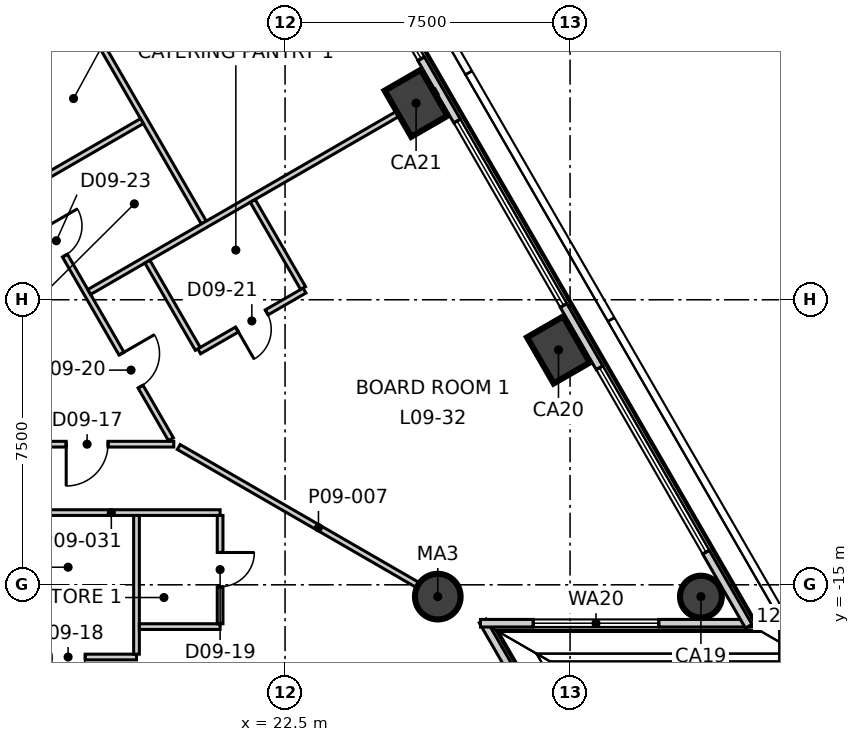
"""IFC4 building model, lengths in metres.
Left out: names, types, materials, properties, quantities, classifications, styles, units other than length and angle.
Written with IfcOpenShell. Run it as: python <this file> out.ifc"""

import sys

from ifc_helpers import new_model, si_unit, direction, frame, frame_2d, origin, origin_2d, place, context, subcontext, project, spatial, rectangle, circle, extrude, element, fill, save


model = new_model("IFC4")
c1 = context("Model", 3, precision=1e-05, world=origin(), true_north=direction((0.0, 1.0)))
c2 = subcontext(c1, "Body", "Model", "MODEL_VIEW")
j1 = project(units=[si_unit("LENGTHUNIT", "METRE"), si_unit("PLANEANGLEUNIT", "RADIAN")], contexts=[c1])
p1 = place(None, origin())
s1 = spatial("IfcSite", under=j1, at=p1, CompositionType="ELEMENT")
p2 = place(p1, origin())
s2 = spatial("IfcBuilding", under=s1, at=p2, CompositionType="ELEMENT")
p3 = place(p2, frame((0.0, 0.0, 47.3)))
s3 = spatial("IfcBuildingStorey", under=s2, at=p3, CompositionType="ELEMENT", Elevation=47.3)
p4 = place(p3, frame((33.443, -15.311, -0.3), z_axis=(0.0, 0.0, 1.0), x_axis=(-0.5, 0.866025403784, 0.0)))
e1 = element("IfcColumn", 1, at=p4, inside=s3, PredefinedType="COLUMN", context=c2, shape_type="SweptSolid", body=[
    extrude(circle(Radius=0.55, at=origin_2d()), origin(), (0.0, 0.0, 1.0), 4.0),
])
for number, where, z_axis, x_axis in (
    (2, (29.695, -8.82, -0.3), (0.0, 0.0, 1.0), (-0.5, 0.866, 0.0)),
    (3, (25.948, -2.329, -0.3), (0.0, 0.0, 1.0), (-0.5, 0.866, 0.0)),
):
    element("IfcColumn", number, at=place(p3, frame(where, z_axis=z_axis, x_axis=x_axis)), inside=s3, PredefinedType="COLUMN", context=c2, shape_type="SweptSolid", body=[
        extrude(rectangle(XDim=1.4, YDim=1.1, at=origin_2d()), origin(), (0.0, 0.0, 1.0), 4.0),
    ])
p5 = place(p3, frame((26.519, -15.311, -0.3), z_axis=(0.0, 0.0, 1.0), x_axis=(1.0, 0.0, 0.0)))
e4 = element("IfcColumn", 4, at=p5, inside=s3, PredefinedType="COLUMN", context=c2, shape_type="SweptSolid", body=[
    extrude(circle(Radius=0.6, at=origin_2d()), origin(), (0.0, 0.0, 1.0), 4.0),
])
p6 = place(p3, frame((31.239, -22.085, 0.0), z_axis=(0.0, 0.0, 1.0), x_axis=(-0.499993928037, 0.866028909405, 0.0)))
e5 = element("IfcWall", 5, at=p6, inside=s3, PredefinedType="ELEMENTEDWALL", context=c2, shape_type="SweptSolid", body=[
    extrude(rectangle(XDim=7.084, YDim=0.2, at=frame_2d((3.542, 0.0))), origin(), (0.0, 0.0, 1.0), 3.7),
])
p7 = place(p6, frame((1.99, 0.0, 0.9)))
e6 = element("IfcOpeningElement", 6, at=p7, cuts=e5, PredefinedType="OPENING", context=c2, shape_type="SweptSolid", body=[
    extrude(rectangle(XDim=3.3, YDim=2.5, at=frame_2d((1.65, 1.25))), frame((0.0, 0.11, 0.0), z_axis=(0.0, -1.0, 0.0), x_axis=(1.0, 0.0, 0.0)), (0.0, 0.0, 1.0), 0.22),
])
p8 = place(p3, frame((27.642, -16.011, 0.0), z_axis=(0.0, 0.0, 1.0), x_axis=(1.0, 0.0, 0.0)))
e7 = element("IfcWall", 7, at=p8, inside=s3, PredefinedType="ELEMENTEDWALL", context=c2, shape_type="SweptSolid", body=[
    extrude(rectangle(XDim=7.084, YDim=0.2, at=frame_2d((3.542, 0.0))), origin(), (0.0, 0.0, 1.0), 3.7),
])
p9 = place(p8, frame((1.39, 0.0, 0.9)))
e8 = element("IfcOpeningElement", 8, at=p9, cuts=e7, PredefinedType="OPENING", context=c2, shape_type="SweptSolid", body=[
    extrude(rectangle(XDim=3.3, YDim=2.5, at=frame_2d((1.65, 1.25))), frame((0.0, 0.11, 0.0), z_axis=(0.0, -1.0, 0.0), x_axis=(1.0, 0.0, 0.0)), (0.0, 0.0, 1.0), 0.22),
])
p10 = place(p3, frame((34.701, -16.089, 0.0), z_axis=(0.0, 0.0, 1.0), x_axis=(-0.499998722828, 0.866026141159, 0.0)))
e9 = element("IfcWall", 9, at=p10, inside=s3, PredefinedType="ELEMENTEDWALL", context=c2, shape_type="SweptSolid", body=[
    extrude(rectangle(XDim=62.548, YDim=0.2, at=frame_2d((31.274, 0.0))), origin(), (0.0, 0.0, 1.0), 3.7),
])
p11 = place(p10, frame((2.25, 0.0, 0.9)))
e10 = element("IfcOpeningElement", 10, at=p11, cuts=e9, PredefinedType="OPENING", context=c2, shape_type="SweptSolid", body=[
    extrude(rectangle(XDim=5.6, YDim=2.5, at=frame_2d((2.8, 1.25))), frame((0.0, 0.11, 0.0), z_axis=(0.0, -1.0, 0.0), x_axis=(1.0, 0.0, 0.0)), (0.0, 0.0, 1.0), 0.22),
])
p12 = place(p10, frame((9.746, 0.0, 0.9)))
e11 = element("IfcOpeningElement", 11, at=p12, cuts=e9, PredefinedType="OPENING", context=c2, shape_type="SweptSolid", body=[
    extrude(rectangle(XDim=5.6, YDim=2.5, at=frame_2d((2.8, 1.25))), frame((0.0, 0.11, 0.0), z_axis=(0.0, -1.0, 0.0), x_axis=(1.0, 0.0, 0.0)), (0.0, 0.0, 1.0), 0.22),
])
p13 = place(p10, frame((17.241, 0.0, 0.9)))
e12 = element("IfcOpeningElement", 12, at=p13, cuts=e9, PredefinedType="OPENING", context=c2, shape_type="SweptSolid", body=[
    extrude(rectangle(XDim=5.6, YDim=2.5, at=frame_2d((2.8, 1.25))), frame((0.0, 0.11, 0.0), z_axis=(0.0, -1.0, 0.0), x_axis=(1.0, 0.0, 0.0)), (0.0, 0.0, 1.0), 0.22),
])
p14 = place(p10, frame((24.736, 0.0, 0.9)))
e13 = element("IfcOpeningElement", 13, at=p14, cuts=e9, PredefinedType="OPENING", context=c2, shape_type="SweptSolid", body=[
    extrude(rectangle(XDim=5.6, YDim=2.5, at=frame_2d((2.8, 1.25))), frame((0.0, 0.11, 0.0), z_axis=(0.0, -1.0, 0.0), x_axis=(1.0, 0.0, 0.0)), (0.0, 0.0, 1.0), 0.22),
])
p15 = place(p10, frame((32.232, 0.0, 0.9)))
e14 = element("IfcOpeningElement", 14, at=p15, cuts=e9, PredefinedType="OPENING", context=c2, shape_type="SweptSolid", body=[
    extrude(rectangle(XDim=5.6, YDim=2.5, at=frame_2d((2.8, 1.25))), frame((0.0, 0.11, 0.0), z_axis=(0.0, -1.0, 0.0), x_axis=(1.0, 0.0, 0.0)), (0.0, 0.0, 1.0), 0.22),
])
p16 = place(p10, frame((39.727, 0.0, 0.9)))
e15 = element("IfcOpeningElement", 15, at=p16, cuts=e9, PredefinedType="OPENING", context=c2, shape_type="SweptSolid", body=[
    extrude(rectangle(XDim=5.6, YDim=2.5, at=frame_2d((2.8, 1.25))), frame((0.0, 0.11, 0.0), z_axis=(0.0, -1.0, 0.0), x_axis=(1.0, 0.0, 0.0)), (0.0, 0.0, 1.0), 0.22),
])
p17 = place(p10, frame((47.222, 0.0, 0.9)))
e16 = element("IfcOpeningElement", 16, at=p17, cuts=e9, PredefinedType="OPENING", context=c2, shape_type="SweptSolid", body=[
    extrude(rectangle(XDim=5.6, YDim=2.5, at=frame_2d((2.8, 1.25))), frame((0.0, 0.11, 0.0), z_axis=(0.0, -1.0, 0.0), x_axis=(1.0, 0.0, 0.0)), (0.0, 0.0, 1.0), 0.22),
])
p18 = place(p10, frame((54.717, 0.0, 0.9)))
e17 = element("IfcOpeningElement", 17, at=p18, cuts=e9, PredefinedType="OPENING", context=c2, shape_type="SweptSolid", body=[
    extrude(rectangle(XDim=5.6, YDim=2.5, at=frame_2d((2.8, 1.25))), frame((0.0, 0.11, 0.0), z_axis=(0.0, -1.0, 0.0), x_axis=(1.0, 0.0, 0.0)), (0.0, 0.0, 1.0), 0.22),
])
p19 = place(p3, frame((-19.422, -11.3, 0.0), z_axis=(0.0, 0.0, 1.0), x_axis=(1.0, 0.0, 0.0)))
e18 = element("IfcWall", 18, at=p19, inside=s3, PredefinedType="PARTITIONING", context=c2, shape_type="SweptSolid", body=[
    extrude(rectangle(XDim=38.994, YDim=0.15, at=frame_2d((19.497, 0.0))), origin(), (0.0, 0.0, 1.0), 3.7),
])
p20 = place(p19, frame((1.6, 0.0, 0.0)))
e19 = element("IfcOpeningElement", 19, at=p20, cuts=e18, PredefinedType="OPENING", context=c2, shape_type="SweptSolid", body=[
    extrude(rectangle(XDim=1.1, YDim=2.1, at=frame_2d((0.55, 1.05))), frame((0.0, 0.085, 0.0), z_axis=(0.0, -1.0, 0.0), x_axis=(1.0, 0.0, 0.0)), (0.0, 0.0, 1.0), 0.17),
])
p21 = place(p19, frame((7.682, 0.0, 0.0)))
e20 = element("IfcOpeningElement", 20, at=p21, cuts=e18, PredefinedType="OPENING", context=c2, shape_type="SweptSolid", body=[
    extrude(rectangle(XDim=1.0, YDim=2.1, at=frame_2d((0.5, 1.05))), frame((0.0, 0.085, 0.0), z_axis=(0.0, -1.0, 0.0), x_axis=(1.0, 0.0, 0.0)), (0.0, 0.0, 1.0), 0.17),
])
p22 = place(p19, frame((15.177, 0.0, 0.0)))
e21 = element("IfcOpeningElement", 21, at=p22, cuts=e18, PredefinedType="OPENING", context=c2, shape_type="SweptSolid", body=[
    extrude(rectangle(XDim=1.0, YDim=2.1, at=frame_2d((0.5, 1.05))), frame((0.0, 0.085, 0.0), z_axis=(0.0, -1.0, 0.0), x_axis=(1.0, 0.0, 0.0)), (0.0, 0.0, 1.0), 0.17),
])
p23 = place(p19, frame((29.372, 0.0, 0.0)))
e22 = element("IfcOpeningElement", 22, at=p23, cuts=e18, PredefinedType="OPENING", context=c2, shape_type="SweptSolid", body=[
    extrude(rectangle(XDim=1.1, YDim=2.1, at=frame_2d((0.55, 1.05))), frame((0.0, 0.085, 0.0), z_axis=(0.0, -1.0, 0.0), x_axis=(1.0, 0.0, 0.0)), (0.0, 0.0, 1.0), 0.17),
])
p24 = place(p19, frame((20.772, 0.0, 0.0)))
e23 = element("IfcOpeningElement", 23, at=p24, cuts=e18, PredefinedType="OPENING", context=c2, shape_type="SweptSolid", body=[
    extrude(rectangle(XDim=0.9, YDim=2.1, at=frame_2d((0.45, 1.05))), frame((0.0, 0.085, 0.0), z_axis=(0.0, -1.0, 0.0), x_axis=(1.0, 0.0, 0.0)), (0.0, 0.0, 1.0), 0.17),
])
p25 = place(p19, frame((23.772, 0.0, 0.0)))
e24 = element("IfcOpeningElement", 24, at=p25, cuts=e18, PredefinedType="OPENING", context=c2, shape_type="SweptSolid", body=[
    extrude(rectangle(XDim=0.9, YDim=2.1, at=frame_2d((0.45, 1.05))), frame((0.0, 0.085, 0.0), z_axis=(0.0, -1.0, 0.0), x_axis=(1.0, 0.0, 0.0)), (0.0, 0.0, 1.0), 0.17),
])
p26 = place(p19, frame((36.163, 0.0, 0.0)))
e25 = element("IfcOpeningElement", 25, at=p26, cuts=e18, PredefinedType="OPENING", context=c2, shape_type="SweptSolid", body=[
    extrude(rectangle(XDim=1.1, YDim=2.1, at=frame_2d((0.55, 1.05))), frame((0.0, 0.085, 0.0), z_axis=(0.0, -1.0, 0.0), x_axis=(1.0, 0.0, 0.0)), (0.0, 0.0, 1.0), 0.17),
])
p27 = place(p3, frame((19.702, -11.374, 0.0), z_axis=(0.0, 0.0, 1.0), x_axis=(0.865962467537, -0.500108992938, 0.0)))
e26 = element("IfcWall", 26, at=p27, inside=s3, PredefinedType="PARTITIONING", context=c2, shape_type="SweptSolid", body=[
    extrude(rectangle(XDim=8.492, YDim=0.15, at=frame_2d((4.246, 0.0))), origin(), (0.0, 0.0, 1.0), 3.1),
])
p28 = place(p3, frame((0.075, 22.47, 0.0), z_axis=(0.0, 0.0, 1.0), x_axis=(0.500002280369, -0.866024087209, 0.0)))
e27 = element("IfcWall", 27, at=p28, inside=s3, PredefinedType="PARTITIONING", context=c2, shape_type="SweptSolid", body=[
    extrude(rectangle(XDim=38.844, YDim=0.15, at=frame_2d((19.422, 0.0))), origin(), (0.0, 0.0, 1.0), 3.7),
])
p29 = place(p28, frame((36.244, 0.0, 0.0)))
e28 = element("IfcOpeningElement", 28, at=p29, cuts=e27, PredefinedType="OPENING", context=c2, shape_type="SweptSolid", body=[
    extrude(rectangle(XDim=1.0, YDim=2.1, at=frame_2d((0.5, 1.05))), frame((0.0, 0.085, 0.0), z_axis=(0.0, -1.0, 0.0), x_axis=(1.0, 0.0, 0.0)), (0.0, 0.0, 1.0), 0.17),
])
p30 = place(p28, frame((21.963, 0.0, 0.0)))
e29 = element("IfcOpeningElement", 29, at=p30, cuts=e27, PredefinedType="OPENING", context=c2, shape_type="SweptSolid", body=[
    extrude(rectangle(XDim=1.1, YDim=2.1, at=frame_2d((0.55, 1.05))), frame((0.0, 0.085, 0.0), z_axis=(0.0, -1.0, 0.0), x_axis=(1.0, 0.0, 0.0)), (0.0, 0.0, 1.0), 0.17),
])
p31 = place(p28, frame((32.363, 0.0, 0.0)))
e30 = element("IfcOpeningElement", 30, at=p31, cuts=e27, PredefinedType="OPENING", context=c2, shape_type="SweptSolid", body=[
    extrude(rectangle(XDim=0.9, YDim=2.1, at=frame_2d((0.45, 1.05))), frame((0.0, 0.085, 0.0), z_axis=(0.0, -1.0, 0.0), x_axis=(1.0, 0.0, 0.0)), (0.0, 0.0, 1.0), 0.17),
])
p32 = place(p28, frame((29.163, 0.0, 0.0)))
e31 = element("IfcOpeningElement", 31, at=p32, cuts=e27, PredefinedType="OPENING", context=c2, shape_type="SweptSolid", body=[
    extrude(rectangle(XDim=0.9, YDim=2.1, at=frame_2d((0.45, 1.05))), frame((0.0, 0.085, 0.0), z_axis=(0.0, -1.0, 0.0), x_axis=(1.0, 0.0, 0.0)), (0.0, 0.0, 1.0), 0.17),
])
p33 = place(p28, frame((26.263, 0.0, 0.0)))
e32 = element("IfcOpeningElement", 32, at=p33, cuts=e27, PredefinedType="OPENING", context=c2, shape_type="SweptSolid", body=[
    extrude(rectangle(XDim=1.0, YDim=2.1, at=frame_2d((0.5, 1.05))), frame((0.0, 0.085, 0.0), z_axis=(0.0, -1.0, 0.0), x_axis=(1.0, 0.0, 0.0)), (0.0, 0.0, 1.0), 0.17),
])
p34 = place(p28, frame((9.071, 0.0, 0.0)))
e33 = element("IfcOpeningElement", 33, at=p34, cuts=e27, PredefinedType="OPENING", context=c2, shape_type="SweptSolid", body=[
    extrude(rectangle(XDim=1.1, YDim=2.1, at=frame_2d((0.55, 1.05))), frame((0.0, 0.085, 0.0), z_axis=(0.0, -1.0, 0.0), x_axis=(1.0, 0.0, 0.0)), (0.0, 0.0, 1.0), 0.17),
])
p35 = place(p3, frame((15.999, 2.088, 0.0), z_axis=(0.0, 0.0, 1.0), x_axis=(0.500054279689, -0.865994063124, 0.0)))
e34 = element("IfcWall", 34, at=p35, inside=s3, PredefinedType="PARTITIONING", context=c2, shape_type="SweptSolid", body=[
    extrude(rectangle(XDim=8.725, YDim=0.15, at=frame_2d((4.363, 0.0))), origin(), (0.0, 0.0, 1.0), 3.7),
])
p36 = place(p3, frame((14.147, -1.753, 0.0), z_axis=(0.0, 0.0, 1.0), x_axis=(0.865991092016, 0.500059425018, 0.0)))
e35 = element("IfcWall", 35, at=p36, inside=s3, PredefinedType="PARTITIONING", context=c2, shape_type="SweptSolid", body=[
    extrude(rectangle(XDim=3.449, YDim=0.15, at=frame_2d((1.725, 0.0))), origin(), (0.0, 0.0, 1.0), 3.7),
])
p37 = place(p3, frame((15.747, -4.524, 0.0), z_axis=(0.0, 0.0, 1.0), x_axis=(0.865973391227, 0.500090077572, 0.0)))
e36 = element("IfcWall", 36, at=p37, inside=s3, PredefinedType="PARTITIONING", context=c2, shape_type="SweptSolid", body=[
    extrude(rectangle(XDim=3.449, YDim=0.15, at=frame_2d((1.725, 0.0))), origin(), (0.0, 0.0, 1.0), 3.7),
])
p38 = place(p3, frame((17.347, -7.295, 0.0), z_axis=(0.0, 0.0, 1.0), x_axis=(0.866027613664, 0.499996172356, 0.0)))
e37 = element("IfcWall", 37, at=p38, inside=s3, PredefinedType="PARTITIONING", context=c2, shape_type="SweptSolid", body=[
    extrude(rectangle(XDim=10.552, YDim=0.15, at=frame_2d((5.276, 0.0))), origin(), (0.0, 0.0, 1.0), 3.7),
])
p39 = place(p3, frame((15.066, -16.9, 0.0), z_axis=(0.0, 0.0, 1.0), x_axis=(1.0, 0.0, 0.0)))
e38 = element("IfcWall", 38, at=p39, inside=s3, PredefinedType="PARTITIONING", context=c2, shape_type="SweptSolid", body=[
    extrude(rectangle(XDim=3.525, YDim=0.15, at=frame_2d((1.763, 0.0))), origin(), (0.0, 0.0, 1.0), 3.7),
])
p40 = place(p39, frame((1.275, 0.0, 0.0)))
e39 = element("IfcOpeningElement", 39, at=p40, cuts=e38, PredefinedType="OPENING", context=c2, shape_type="SweptSolid", body=[
    extrude(rectangle(XDim=0.9, YDim=2.1, at=frame_2d((0.45, 1.05))), frame((0.0, 0.085, 0.0), z_axis=(0.0, -1.0, 0.0), x_axis=(1.0, 0.0, 0.0)), (0.0, 0.0, 1.0), 0.17),
])
p41 = place(p3, frame((18.591, -16.825, 0.0), z_axis=(0.0, 0.0, 1.0), x_axis=(0.0, 1.0, 0.0)))
e40 = element("IfcWall", 40, at=p41, inside=s3, PredefinedType="PARTITIONING", context=c2, shape_type="SweptSolid", body=[
    extrude(rectangle(XDim=3.65, YDim=0.15, at=frame_2d((1.825, 0.0))), origin(), (0.0, 0.0, 1.0), 3.7),
])
p42 = place(p3, frame((15.066, -13.1, 0.0), z_axis=(0.0, 0.0, 1.0), x_axis=(1.0, 0.0, 0.0)))
e41 = element("IfcWall", 41, at=p42, inside=s3, PredefinedType="PARTITIONING", context=c2, shape_type="SweptSolid", body=[
    extrude(rectangle(XDim=5.725, YDim=0.15, at=frame_2d((2.863, 0.0))), origin(), (0.0, 0.0, 1.0), 3.7),
])
p43 = place(p3, frame((18.666, -16.1, 0.0), z_axis=(0.0, 0.0, 1.0), x_axis=(1.0, 0.0, 0.0)))
e42 = element("IfcWall", 42, at=p43, inside=s3, PredefinedType="PARTITIONING", context=c2, shape_type="SweptSolid", body=[
    extrude(rectangle(XDim=2.125, YDim=0.15, at=frame_2d((1.062, 0.0))), origin(), (0.0, 0.0, 1.0), 3.7),
])
p44 = place(p3, frame((20.791, -16.025, 0.0), z_axis=(0.0, 0.0, 1.0), x_axis=(0.0, 1.0, 0.0)))
e43 = element("IfcWall", 43, at=p44, inside=s3, PredefinedType="PARTITIONING", context=c2, shape_type="SweptSolid", body=[
    extrude(rectangle(XDim=2.85, YDim=0.15, at=frame_2d((1.425, 0.0))), origin(), (0.0, 0.0, 1.0), 3.7),
])
p45 = place(p44, frame((0.975, 0.0, 0.0)))
e44 = element("IfcOpeningElement", 44, at=p45, cuts=e43, PredefinedType="OPENING", context=c2, shape_type="SweptSolid", body=[
    extrude(rectangle(XDim=0.9, YDim=2.1, at=frame_2d((0.45, 1.05))), frame((0.0, 0.085, 0.0), z_axis=(0.0, -1.0, 0.0), x_axis=(1.0, 0.0, 0.0)), (0.0, 0.0, 1.0), 0.17),
])
p46 = place(p3, frame((20.24, -8.857, 0.0), z_axis=(0.0, 0.0, 1.0), x_axis=(0.866099216793, 0.499872130319, 0.0)))
e45 = element("IfcWall", 45, at=p46, inside=s3, PredefinedType="PARTITIONING", context=c2, shape_type="SweptSolid", body=[
    extrude(rectangle(XDim=3.2, YDim=0.15, at=frame_2d((1.6, 0.0))), origin(), (0.0, 0.0, 1.0), 3.7),
])
p47 = place(p46, frame((1.15, 0.0, 0.0)))
e46 = element("IfcOpeningElement", 46, at=p47, cuts=e45, PredefinedType="OPENING", context=c2, shape_type="SweptSolid", body=[
    extrude(rectangle(XDim=0.9, YDim=2.1, at=frame_2d((0.45, 1.05))), frame((0.0, 0.085, 0.0), z_axis=(0.0, -1.0, 0.0), x_axis=(1.0, 0.0, 0.0)), (0.0, 0.0, 1.0), 0.17),
])
for number, where, z_axis, x_axis in (
    (47, (21.649, -4.898, 0.0), (0.0, 0.0, 1.0), (0.5, -0.866, 0.0)),
    (48, (18.878, -6.498, 0.0), (0.0, 0.0, 1.0), (0.5, -0.866, 0.0)),
):
    element("IfcWall", number, at=place(p3, frame(where, z_axis=z_axis, x_axis=x_axis)), inside=s3, PredefinedType="PARTITIONING", context=c2, shape_type="SweptSolid", body=[
        extrude(rectangle(XDim=2.649, YDim=0.15, at=frame_2d((1.325, 0.0))), origin(), (0.0, 0.0, 1.0), 3.7),
    ])
p48 = place(p9, origin())
e49 = element("IfcWindow", 49, at=p48, inside=s3, PartitioningType="SINGLE_PANEL", PredefinedType="WINDOW", context=c2, shape_type="SweptSolid", body=[
    extrude(rectangle(XDim=3.3, YDim=2.5, at=frame_2d((1.65, 1.25))), frame((0.0, 0.03, 0.0), z_axis=(0.0, -1.0, 0.0), x_axis=(1.0, 0.0, 0.0)), (0.0, 0.0, 1.0), 0.06),
])
fill(e8, e49)
p49 = place(p11, origin())
e50 = element("IfcWindow", 50, at=p49, inside=s3, PartitioningType="SINGLE_PANEL", PredefinedType="WINDOW", context=c2, shape_type="SweptSolid", body=[
    extrude(rectangle(XDim=5.6, YDim=2.5, at=frame_2d((2.8, 1.25))), frame((0.0, 0.03, 0.0), z_axis=(0.0, -1.0, 0.0), x_axis=(1.0, 0.0, 0.0)), (0.0, 0.0, 1.0), 0.06),
])
fill(e10, e50)
p50 = place(p12, origin())
e51 = element("IfcWindow", 51, at=p50, inside=s3, PartitioningType="SINGLE_PANEL", PredefinedType="WINDOW", context=c2, shape_type="SweptSolid", body=[
    extrude(rectangle(XDim=5.6, YDim=2.5, at=frame_2d((2.8, 1.25))), frame((0.0, 0.03, 0.0), z_axis=(0.0, -1.0, 0.0), x_axis=(1.0, 0.0, 0.0)), (0.0, 0.0, 1.0), 0.06),
])
fill(e11, e51)
p51 = place(p13, origin())
e52 = element("IfcWindow", 52, at=p51, inside=s3, PartitioningType="SINGLE_PANEL", PredefinedType="WINDOW", context=c2, shape_type="SweptSolid", body=[
    extrude(rectangle(XDim=5.6, YDim=2.5, at=frame_2d((2.8, 1.25))), frame((0.0, 0.03, 0.0), z_axis=(0.0, -1.0, 0.0), x_axis=(1.0, 0.0, 0.0)), (0.0, 0.0, 1.0), 0.06),
])
fill(e12, e52)
p52 = place(p26, origin())
e53 = element("IfcDoor", 53, at=p52, inside=s3, OperationType="SINGLE_SWING_LEFT", PredefinedType="DOOR", context=c2, shape_type="SweptSolid", body=[
    extrude(rectangle(XDim=1.1, YDim=2.1, at=frame_2d((0.55, 1.05))), frame((0.0, 0.025, 0.0), z_axis=(0.0, -1.0, 0.0), x_axis=(1.0, 0.0, 0.0)), (0.0, 0.0, 1.0), 0.05),
])
fill(e25, e53)
p53 = place(p40, origin())
e54 = element("IfcDoor", 54, at=p53, inside=s3, OperationType="SINGLE_SWING_LEFT", PredefinedType="DOOR", context=c2, shape_type="SweptSolid", body=[
    extrude(rectangle(XDim=0.9, YDim=2.1, at=frame_2d((0.45, 1.05))), frame((0.0, 0.025, 0.0), z_axis=(0.0, -1.0, 0.0), x_axis=(1.0, 0.0, 0.0)), (0.0, 0.0, 1.0), 0.05),
])
fill(e39, e54)
p54 = place(p45, origin())
e55 = element("IfcDoor", 55, at=p54, inside=s3, OperationType="SINGLE_SWING_RIGHT", PredefinedType="DOOR", context=c2, shape_type="SweptSolid", body=[
    extrude(rectangle(XDim=0.9, YDim=2.1, at=frame_2d((0.45, 1.05))), frame((0.0, 0.025, 0.0), z_axis=(0.0, -1.0, 0.0), x_axis=(1.0, 0.0, 0.0)), (0.0, 0.0, 1.0), 0.05),
])
fill(e44, e55)
p55 = place(p29, origin())
e56 = element("IfcDoor", 56, at=p55, inside=s3, OperationType="SINGLE_SWING_RIGHT", PredefinedType="DOOR", context=c2, shape_type="SweptSolid", body=[
    extrude(rectangle(XDim=1.0, YDim=2.1, at=frame_2d((0.5, 1.05))), frame((0.0, 0.025, 0.0), z_axis=(0.0, -1.0, 0.0), x_axis=(1.0, 0.0, 0.0)), (0.0, 0.0, 1.0), 0.05),
])
fill(e28, e56)
p56 = place(p47, origin())
e57 = element("IfcDoor", 57, at=p56, inside=s3, OperationType="SINGLE_SWING_LEFT", PredefinedType="DOOR", context=c2, shape_type="SweptSolid", body=[
    extrude(rectangle(XDim=0.9, YDim=2.1, at=frame_2d((0.45, 1.05))), frame((0.0, 0.025, 0.0), z_axis=(0.0, -1.0, 0.0), x_axis=(1.0, 0.0, 0.0)), (0.0, 0.0, 1.0), 0.05),
])
fill(e46, e57)
p57 = place(p31, origin())
e58 = element("IfcDoor", 58, at=p57, inside=s3, OperationType="SINGLE_SWING_RIGHT", PredefinedType="DOOR", context=c2, shape_type="SweptSolid", body=[
    extrude(rectangle(XDim=0.9, YDim=2.1, at=frame_2d((0.45, 1.05))), frame((0.0, 0.025, 0.0), z_axis=(0.0, -1.0, 0.0), x_axis=(1.0, 0.0, 0.0)), (0.0, 0.0, 1.0), 0.05),
])
fill(e30, e58)
save(model, sys.argv[1])
